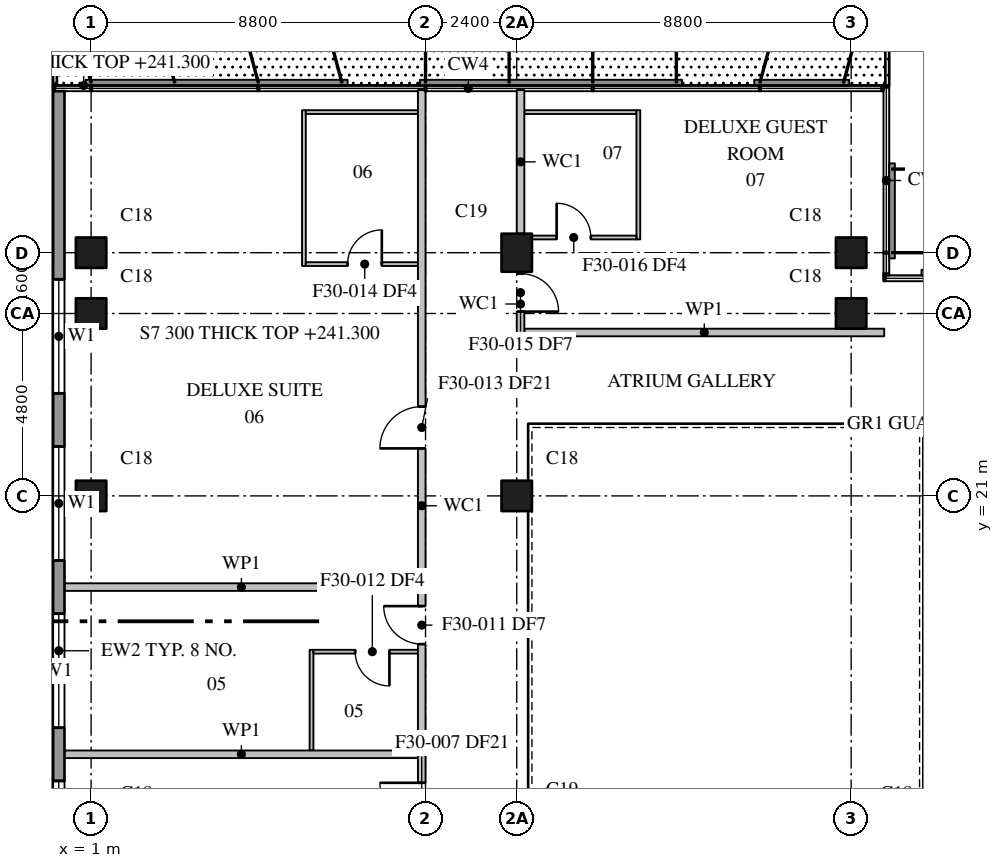
"""IFC4 building model, lengths in metres.
Left out: names, types, materials, properties, quantities, classifications, styles, units other than length and angle.
Written with IfcOpenShell. Run it as: python <this file> out.ifc"""

import sys

from ifc_helpers import new_model, si_unit, direction, frame, frame_2d, origin, origin_2d, place, context, subcontext, project, spatial, rectangle, extrude, element, fill, save


model = new_model("IFC4")
c1 = context("Model", 3, precision=1e-05, world=origin(), true_north=direction((0.0, 1.0)))
c2 = subcontext(c1, "Body", "Model", "MODEL_VIEW")
j1 = project(units=[si_unit("LENGTHUNIT", "METRE"), si_unit("PLANEANGLEUNIT", "RADIAN")], contexts=[c1])
p1 = place(None, origin())
s1 = spatial("IfcSite", under=j1, at=p1, CompositionType="ELEMENT")
p2 = place(p1, origin())
s2 = spatial("IfcBuilding", under=s1, at=p2, CompositionType="ELEMENT")
p3 = place(p2, frame((0.0, 0.0, 241.3)))
s3 = spatial("IfcBuildingStorey", under=s2, at=p3, CompositionType="ELEMENT", Elevation=241.3)
for number, where, z_axis, x_axis in (
    (1, (1.0, 21.0, 0.0), (0.0, 0.0, 1.0), (1.0, 0.0, 0.0)),
    (2, (1.0, 25.8, 0.0), (0.0, 0.0, 1.0), (1.0, 0.0, 0.0)),
    (3, (1.0, 27.4, 0.0), (0.0, 0.0, 1.0), (1.0, 0.0, 0.0)),
    (4, (12.2, 21.0, 0.0), (0.0, 0.0, 1.0), (1.0, 0.0, 0.0)),
):
    element("IfcColumn", number, at=place(p3, frame(where, z_axis=z_axis, x_axis=x_axis)), inside=s3, PredefinedType="COLUMN", context=c2, shape_type="SweptSolid", body=[
        extrude(rectangle(XDim=0.8, YDim=0.8, at=origin_2d()), origin(), (0.0, 0.0, 1.0), 3.7),
    ])
p4 = place(p3, frame((12.2, 27.4, 0.0), z_axis=(0.0, 0.0, 1.0), x_axis=(0.0, 1.0, 0.0)))
e5 = element("IfcColumn", 5, at=p4, inside=s3, PredefinedType="COLUMN", context=c2, shape_type="SweptSolid", body=[
    extrude(rectangle(XDim=1.0, YDim=0.8, at=origin_2d()), origin(), (0.0, 0.0, 1.0), 3.7),
])
for number, where, z_axis, x_axis in (
    (6, (21.0, 25.8, 0.0), (0.0, 0.0, 1.0), (1.0, 0.0, 0.0)),
    (7, (21.0, 27.4, 0.0), (0.0, 0.0, 1.0), (1.0, 0.0, 0.0)),
):
    element("IfcColumn", number, at=place(p3, frame(where, z_axis=z_axis, x_axis=x_axis)), inside=s3, PredefinedType="COLUMN", context=c2, shape_type="SweptSolid", body=[
        extrude(rectangle(XDim=0.8, YDim=0.8, at=origin_2d()), origin(), (0.0, 0.0, 1.0), 3.7),
    ])
p5 = place(p3, frame((0.15, 31.65, 0.0), z_axis=(0.0, 0.0, 1.0), x_axis=(0.0, -1.0, 0.0)))
e8 = element("IfcWall", 8, at=p5, inside=s3, PredefinedType="STANDARD", context=c2, shape_type="SweptSolid", body=[
    extrude(rectangle(XDim=29.45, YDim=0.3, at=frame_2d((14.725, 0.0))), origin(), (0.0, 0.0, 1.0), 3.4),
])
p6 = place(p5, frame((4.95, 0.0, 0.75)))
e9 = element("IfcOpeningElement", 9, at=p6, cuts=e8, PredefinedType="OPENING", context=c2, shape_type="SweptSolid", body=[
    extrude(rectangle(XDim=3.0, YDim=2.3, at=frame_2d((1.5, 1.15))), frame((0.0, 0.16, 0.0), z_axis=(0.0, -1.0, 0.0), x_axis=(1.0, 0.0, 0.0)), (0.0, 0.0, 1.0), 0.32),
])
p7 = place(p5, frame((9.35, 0.0, 0.75)))
e10 = element("IfcOpeningElement", 10, at=p7, cuts=e8, PredefinedType="OPENING", context=c2, shape_type="SweptSolid", body=[
    extrude(rectangle(XDim=3.0, YDim=2.3, at=frame_2d((1.5, 1.15))), frame((0.0, 0.16, 0.0), z_axis=(0.0, -1.0, 0.0), x_axis=(1.0, 0.0, 0.0)), (0.0, 0.0, 1.0), 0.32),
])
p8 = place(p5, frame((13.75, 0.0, 0.75)))
e11 = element("IfcOpeningElement", 11, at=p8, cuts=e8, PredefinedType="OPENING", context=c2, shape_type="SweptSolid", body=[
    extrude(rectangle(XDim=3.0, YDim=2.3, at=frame_2d((1.5, 1.15))), frame((0.0, 0.16, 0.0), z_axis=(0.0, -1.0, 0.0), x_axis=(1.0, 0.0, 0.0)), (0.0, 0.0, 1.0), 0.32),
])
p9 = place(p5, frame((18.15, 0.0, 0.75)))
e12 = element("IfcOpeningElement", 12, at=p9, cuts=e8, PredefinedType="OPENING", context=c2, shape_type="SweptSolid", body=[
    extrude(rectangle(XDim=3.0, YDim=2.3, at=frame_2d((1.5, 1.15))), frame((0.0, 0.16, 0.0), z_axis=(0.0, -1.0, 0.0), x_axis=(1.0, 0.0, 0.0)), (0.0, 0.0, 1.0), 0.32),
])
p10 = place(p5, frame((22.55, 0.0, 0.75)))
e13 = element("IfcOpeningElement", 13, at=p10, cuts=e8, PredefinedType="OPENING", context=c2, shape_type="SweptSolid", body=[
    extrude(rectangle(XDim=3.0, YDim=2.3, at=frame_2d((1.5, 1.15))), frame((0.0, 0.16, 0.0), z_axis=(0.0, -1.0, 0.0), x_axis=(1.0, 0.0, 0.0)), (0.0, 0.0, 1.0), 0.32),
])
p11 = place(p3, frame((9.7, 9.8, 0.0), z_axis=(0.0, 0.0, 1.0), x_axis=(0.0, 1.0, 0.0)))
e14 = element("IfcWall", 14, at=p11, inside=s3, PredefinedType="PARTITIONING", context=c2, shape_type="SweptSolid", body=[
    extrude(rectangle(XDim=21.88, YDim=0.2, at=frame_2d((10.94, 0.0))), origin(), (0.0, 0.0, 1.0), 3.4),
])
p12 = place(p11, frame((2.55, 0.0, 0.0)))
e15 = element("IfcOpeningElement", 15, at=p12, cuts=e14, PredefinedType="OPENING", context=c2, shape_type="SweptSolid", body=[
    extrude(rectangle(XDim=1.1, YDim=2.1, at=frame_2d((0.55, 1.05))), frame((0.0, 0.11, 0.0), z_axis=(0.0, -1.0, 0.0), x_axis=(1.0, 0.0, 0.0)), (0.0, 0.0, 1.0), 0.22),
])
p13 = place(p11, frame((7.3, 0.0, 0.0)))
e16 = element("IfcOpeningElement", 16, at=p13, cuts=e14, PredefinedType="OPENING", context=c2, shape_type="SweptSolid", body=[
    extrude(rectangle(XDim=1.0, YDim=2.1, at=frame_2d((0.5, 1.05))), frame((0.0, 0.11, 0.0), z_axis=(0.0, -1.0, 0.0), x_axis=(1.0, 0.0, 0.0)), (0.0, 0.0, 1.0), 0.22),
])
p14 = place(p11, frame((12.45, 0.0, 0.0)))
e17 = element("IfcOpeningElement", 17, at=p14, cuts=e14, PredefinedType="OPENING", context=c2, shape_type="SweptSolid", body=[
    extrude(rectangle(XDim=1.1, YDim=2.1, at=frame_2d((0.55, 1.05))), frame((0.0, 0.11, 0.0), z_axis=(0.0, -1.0, 0.0), x_axis=(1.0, 0.0, 0.0)), (0.0, 0.0, 1.0), 0.22),
])
for number, where, z_axis, x_axis in (
    (18, (0.31, 14.2, 0.0), (0.0, 0.0, 1.0), (1.0, 0.0, 0.0)),
    (19, (0.31, 18.6, 0.0), (0.0, 0.0, 1.0), (1.0, 0.0, 0.0)),
):
    element("IfcWall", number, at=place(p3, frame(where, z_axis=z_axis, x_axis=x_axis)), inside=s3, PredefinedType="PARTITIONING", context=c2, shape_type="SweptSolid", body=[
        extrude(rectangle(XDim=9.29, YDim=0.2, at=frame_2d((4.645, 0.0))), origin(), (0.0, 0.0, 1.0), 3.4),
    ])
p15 = place(p3, frame((12.3, 26.9, 0.0), z_axis=(0.0, 0.0, 1.0), x_axis=(0.0, -1.0, 0.0)))
e20 = element("IfcWall", 20, at=p15, inside=s3, PredefinedType="PARTITIONING", context=c2, shape_type="SweptSolid", body=[
    extrude(rectangle(XDim=1.7, YDim=0.2, at=frame_2d((0.85, 0.0))), origin(), (0.0, 0.0, 1.0), 3.4),
])
p16 = place(p15, frame((0.05, 0.0, 0.0)))
e21 = element("IfcOpeningElement", 21, at=p16, cuts=e20, PredefinedType="OPENING", context=c2, shape_type="SweptSolid", body=[
    extrude(rectangle(XDim=1.0, YDim=2.1, at=frame_2d((0.5, 1.05))), frame((0.0, 0.11, 0.0), z_axis=(0.0, -1.0, 0.0), x_axis=(1.0, 0.0, 0.0)), (0.0, 0.0, 1.0), 0.22),
])
p17 = place(p3, frame((12.3, 27.9, 0.0), z_axis=(0.0, 0.0, 1.0), x_axis=(0.0, 1.0, 0.0)))
e22 = element("IfcWall", 22, at=p17, inside=s3, PredefinedType="PARTITIONING", context=c2, shape_type="SweptSolid", body=[
    extrude(rectangle(XDim=3.78, YDim=0.2, at=frame_2d((1.89, 0.0))), origin(), (0.0, 0.0, 1.0), 3.4),
])
p18 = place(p3, frame((12.4, 25.3, 0.0), z_axis=(0.0, 0.0, 1.0), x_axis=(1.0, 0.0, 0.0)))
e23 = element("IfcWall", 23, at=p18, inside=s3, PredefinedType="PARTITIONING", context=c2, shape_type="SweptSolid", body=[
    extrude(rectangle(XDim=9.47, YDim=0.2, at=frame_2d((4.735, 0.0))), origin(), (0.0, 0.0, 1.0), 3.4),
])
p19 = place(p3, frame((6.8, 14.3, 0.0), z_axis=(0.0, 0.0, 1.0), x_axis=(0.0, 1.0, 0.0)))
e24 = element("IfcWall", 24, at=p19, inside=s3, PredefinedType="PARTITIONING", context=c2, shape_type="SweptSolid", body=[
    extrude(rectangle(XDim=2.65, YDim=0.1, at=frame_2d((1.325, 0.0))), origin(), (0.0, 0.0, 1.0), 3.4),
])
p20 = place(p3, frame((9.6, 16.9, 0.0), z_axis=(0.0, 0.0, 1.0), x_axis=(-1.0, 0.0, 0.0)))
e25 = element("IfcWall", 25, at=p20, inside=s3, PredefinedType="PARTITIONING", context=c2, shape_type="SweptSolid", body=[
    extrude(rectangle(XDim=2.75, YDim=0.1, at=frame_2d((1.375, 0.0))), origin(), (0.0, 0.0, 1.0), 3.4),
])
p21 = place(p20, frame((0.75, 0.0, 0.0)))
e26 = element("IfcOpeningElement", 26, at=p21, cuts=e25, PredefinedType="OPENING", context=c2, shape_type="SweptSolid", body=[
    extrude(rectangle(XDim=0.9, YDim=2.1, at=frame_2d((0.45, 1.05))), frame((0.0, 0.06, 0.0), z_axis=(0.0, -1.0, 0.0), x_axis=(1.0, 0.0, 0.0)), (0.0, 0.0, 1.0), 0.12),
])
p22 = place(p3, frame((6.6, 27.05, 0.0), z_axis=(0.0, 0.0, 1.0), x_axis=(0.0, 1.0, 0.0)))
e27 = element("IfcWall", 27, at=p22, inside=s3, PredefinedType="PARTITIONING", context=c2, shape_type="SweptSolid", body=[
    extrude(rectangle(XDim=4.1, YDim=0.1, at=frame_2d((2.05, 0.0))), origin(), (0.0, 0.0, 1.0), 3.4),
])
p23 = place(p3, frame((6.65, 27.1, 0.0), z_axis=(0.0, 0.0, 1.0), x_axis=(1.0, 0.0, 0.0)))
e28 = element("IfcWall", 28, at=p23, inside=s3, PredefinedType="PARTITIONING", context=c2, shape_type="SweptSolid", body=[
    extrude(rectangle(XDim=2.95, YDim=0.1, at=frame_2d((1.475, 0.0))), origin(), (0.0, 0.0, 1.0), 3.4),
])
p24 = place(p23, frame((1.1, 0.0, 0.0)))
e29 = element("IfcOpeningElement", 29, at=p24, cuts=e28, PredefinedType="OPENING", context=c2, shape_type="SweptSolid", body=[
    extrude(rectangle(XDim=0.9, YDim=2.1, at=frame_2d((0.45, 1.05))), frame((0.0, 0.06, 0.0), z_axis=(0.0, -1.0, 0.0), x_axis=(1.0, 0.0, 0.0)), (0.0, 0.0, 1.0), 0.12),
])
for number, where, z_axis, x_axis in (
    (30, (6.65, 31.1, 0.0), (0.0, 0.0, 1.0), (1.0, 0.0, 0.0)),
    (31, (12.4, 31.1, 0.0), (0.0, 0.0, 1.0), (1.0, 0.0, 0.0)),
):
    element("IfcWall", number, at=place(p3, frame(where, z_axis=z_axis, x_axis=x_axis)), inside=s3, PredefinedType="PARTITIONING", context=c2, shape_type="SweptSolid", body=[
        extrude(rectangle(XDim=2.95, YDim=0.1, at=frame_2d((1.475, 0.0))), origin(), (0.0, 0.0, 1.0), 3.4),
    ])
p25 = place(p3, frame((15.4, 27.75, 0.0), z_axis=(0.0, 0.0, 1.0), x_axis=(0.0, 1.0, 0.0)))
e32 = element("IfcWall", 32, at=p25, inside=s3, PredefinedType="PARTITIONING", context=c2, shape_type="SweptSolid", body=[
    extrude(rectangle(XDim=3.4, YDim=0.1, at=frame_2d((1.7, 0.0))), origin(), (0.0, 0.0, 1.0), 3.4),
])
p26 = place(p3, frame((12.6, 27.8, 0.0), z_axis=(0.0, 0.0, 1.0), x_axis=(1.0, 0.0, 0.0)))
e33 = element("IfcWall", 33, at=p26, inside=s3, PredefinedType="PARTITIONING", context=c2, shape_type="SweptSolid", body=[
    extrude(rectangle(XDim=2.75, YDim=0.1, at=frame_2d((1.375, 0.0))), origin(), (0.0, 0.0, 1.0), 3.4),
])
p27 = place(p26, frame((0.65, 0.0, 0.0)))
e34 = element("IfcOpeningElement", 34, at=p27, cuts=e33, PredefinedType="OPENING", context=c2, shape_type="SweptSolid", body=[
    extrude(rectangle(XDim=0.9, YDim=2.1, at=frame_2d((0.45, 1.05))), frame((0.0, 0.06, 0.0), z_axis=(0.0, -1.0, 0.0), x_axis=(1.0, 0.0, 0.0)), (0.0, 0.0, 1.0), 0.12),
])
p28 = place(p6, origin())
e35 = element("IfcWindow", 35, at=p28, inside=s3, PartitioningType="SINGLE_PANEL", PredefinedType="WINDOW", context=c2, shape_type="SweptSolid", body=[
    extrude(rectangle(XDim=3.0, YDim=2.3, at=frame_2d((1.5, 1.15))), frame((0.0, 0.03, 0.0), z_axis=(0.0, -1.0, 0.0), x_axis=(1.0, 0.0, 0.0)), (0.0, 0.0, 1.0), 0.06),
])
fill(e9, e35)
p29 = place(p7, origin())
e36 = element("IfcWindow", 36, at=p29, inside=s3, PartitioningType="SINGLE_PANEL", PredefinedType="WINDOW", context=c2, shape_type="SweptSolid", body=[
    extrude(rectangle(XDim=3.0, YDim=2.3, at=frame_2d((1.5, 1.15))), frame((0.0, 0.03, 0.0), z_axis=(0.0, -1.0, 0.0), x_axis=(1.0, 0.0, 0.0)), (0.0, 0.0, 1.0), 0.06),
])
fill(e10, e36)
p30 = place(p8, origin())
e37 = element("IfcWindow", 37, at=p30, inside=s3, PartitioningType="SINGLE_PANEL", PredefinedType="WINDOW", context=c2, shape_type="SweptSolid", body=[
    extrude(rectangle(XDim=3.0, YDim=2.3, at=frame_2d((1.5, 1.15))), frame((0.0, 0.03, 0.0), z_axis=(0.0, -1.0, 0.0), x_axis=(1.0, 0.0, 0.0)), (0.0, 0.0, 1.0), 0.06),
])
fill(e11, e37)
p31 = place(p9, origin())
e38 = element("IfcWindow", 38, at=p31, inside=s3, PartitioningType="SINGLE_PANEL", PredefinedType="WINDOW", context=c2, shape_type="SweptSolid", body=[
    extrude(rectangle(XDim=3.0, YDim=2.3, at=frame_2d((1.5, 1.15))), frame((0.0, 0.03, 0.0), z_axis=(0.0, -1.0, 0.0), x_axis=(1.0, 0.0, 0.0)), (0.0, 0.0, 1.0), 0.06),
])
fill(e12, e38)
p32 = place(p12, origin())
e39 = element("IfcDoor", 39, at=p32, inside=s3, OperationType="SINGLE_SWING_RIGHT", PredefinedType="DOOR", context=c2, shape_type="SweptSolid", body=[
    extrude(rectangle(XDim=1.1, YDim=2.1, at=frame_2d((0.55, 1.05))), frame((0.0, 0.025, 0.0), z_axis=(0.0, -1.0, 0.0), x_axis=(1.0, 0.0, 0.0)), (0.0, 0.0, 1.0), 0.05),
])
fill(e15, e39)
p33 = place(p13, origin())
e40 = element("IfcDoor", 40, at=p33, inside=s3, OperationType="SINGLE_SWING_RIGHT", PredefinedType="DOOR", context=c2, shape_type="SweptSolid", body=[
    extrude(rectangle(XDim=1.0, YDim=2.1, at=frame_2d((0.5, 1.05))), frame((0.0, 0.025, 0.0), z_axis=(0.0, -1.0, 0.0), x_axis=(1.0, 0.0, 0.0)), (0.0, 0.0, 1.0), 0.05),
])
fill(e16, e40)
p34 = place(p21, origin())
e41 = element("IfcDoor", 41, at=p34, inside=s3, OperationType="SINGLE_SWING_LEFT", PredefinedType="DOOR", context=c2, shape_type="SweptSolid", body=[
    extrude(rectangle(XDim=0.9, YDim=2.1, at=frame_2d((0.45, 1.05))), frame((0.0, 0.025, 0.0), z_axis=(0.0, -1.0, 0.0), x_axis=(1.0, 0.0, 0.0)), (0.0, 0.0, 1.0), 0.05),
])
fill(e26, e41)
p35 = place(p14, origin())
e42 = element("IfcDoor", 42, at=p35, inside=s3, OperationType="SINGLE_SWING_LEFT", PredefinedType="DOOR", context=c2, shape_type="SweptSolid", body=[
    extrude(rectangle(XDim=1.1, YDim=2.1, at=frame_2d((0.55, 1.05))), frame((0.0, 0.025, 0.0), z_axis=(0.0, -1.0, 0.0), x_axis=(1.0, 0.0, 0.0)), (0.0, 0.0, 1.0), 0.05),
])
fill(e17, e42)
p36 = place(p24, origin())
e43 = element("IfcDoor", 43, at=p36, inside=s3, OperationType="SINGLE_SWING_RIGHT", PredefinedType="DOOR", context=c2, shape_type="SweptSolid", body=[
    extrude(rectangle(XDim=0.9, YDim=2.1, at=frame_2d((0.45, 1.05))), frame((0.0, 0.025, 0.0), z_axis=(0.0, -1.0, 0.0), x_axis=(1.0, 0.0, 0.0)), (0.0, 0.0, 1.0), 0.05),
])
fill(e29, e43)
p37 = place(p16, origin())
e44 = element("IfcDoor", 44, at=p37, inside=s3, OperationType="SINGLE_SWING_RIGHT", PredefinedType="DOOR", context=c2, shape_type="SweptSolid", body=[
    extrude(rectangle(XDim=1.0, YDim=2.1, at=frame_2d((0.5, 1.05))), frame((0.0, 0.025, 0.0), z_axis=(0.0, -1.0, 0.0), x_axis=(1.0, 0.0, 0.0)), (0.0, 0.0, 1.0), 0.05),
])
fill(e21, e44)
p38 = place(p27, origin())
e45 = element("IfcDoor", 45, at=p38, inside=s3, OperationType="SINGLE_SWING_LEFT", PredefinedType="DOOR", context=c2, shape_type="SweptSolid", body=[
    extrude(rectangle(XDim=0.9, YDim=2.1, at=frame_2d((0.45, 1.05))), frame((0.0, 0.025, 0.0), z_axis=(0.0, -1.0, 0.0), x_axis=(1.0, 0.0, 0.0)), (0.0, 0.0, 1.0), 0.05),
])
fill(e34, e45)
save(model, sys.argv[1])
